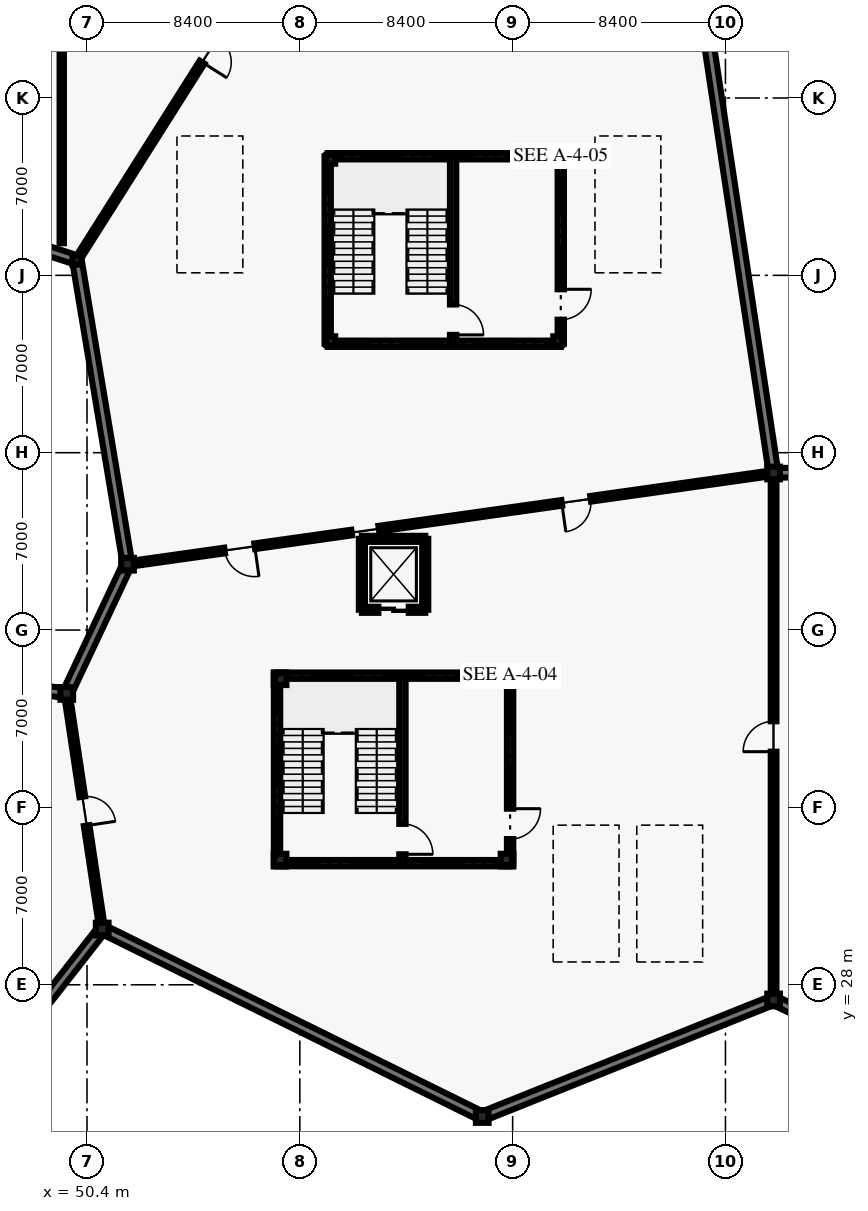
"""IFC4 building model, lengths in metres.
Left out: names, types, materials, properties, quantities, classifications, styles, units other than length and angle.
Written with IfcOpenShell. Run it as: python <this file> out.ifc"""

import sys

from ifc_helpers import new_model, si_unit, direction, frame, frame_2d, origin, origin_2d, place, context, subcontext, project, spatial, rectangle, i_section, extrude, element, fill, save


model = new_model("IFC4")
c1 = context("Model", 3, precision=1e-05, world=origin(), true_north=direction((0.0, 1.0)))
c2 = subcontext(c1, "Body", "Model", "MODEL_VIEW")
j1 = project(units=[si_unit("LENGTHUNIT", "METRE"), si_unit("PLANEANGLEUNIT", "RADIAN")], contexts=[c1])
p1 = place(None, origin())
s1 = spatial("IfcSite", under=j1, at=p1, CompositionType="ELEMENT")
p2 = place(p1, origin())
s2 = spatial("IfcBuilding", under=s1, at=p2, CompositionType="ELEMENT")
p3 = place(p2, frame((0.0, 0.0, -4.5)))
s3 = spatial("IfcBuildingStorey", under=s2, at=p3, CompositionType="ELEMENT", Elevation=-4.5)
p4 = place(p3, frame((49.6, 39.5, 0.0), z_axis=(0.0, 0.0, 1.0), x_axis=(1.0, 0.0, 0.0)))
e1 = element("IfcColumn", 1, at=p4, inside=s3, PredefinedType="COLUMN", context=c2, shape_type="SweptSolid", body=[
    extrude(i_section(OverallWidth=0.5, OverallDepth=0.5, WebThickness=0.022, FlangeThickness=0.036, at=origin_2d()), origin(), (0.0, 0.0, 1.0), 4.5),
])
p5 = place(p3, frame((50.0, 56.6, 0.0), z_axis=(0.0, 0.0, 1.0), x_axis=(1.0, 0.0, 0.0)))
e2 = element("IfcColumn", 2, at=p5, inside=s3, PredefinedType="COLUMN", context=c2, shape_type="SweptSolid", body=[
    extrude(i_section(OverallWidth=0.35, OverallDepth=0.35, WebThickness=0.02, FlangeThickness=0.028, at=origin_2d()), origin(), (0.0, 0.0, 1.0), 4.5),
])
for number, where, z_axis, x_axis in (
    (3, (51.0, 30.2, 0.0), (0.0, 0.0, 1.0), (1.0, 0.0, 0.0)),
    (4, (52.0, 44.6, 0.0), (0.0, 0.0, 1.0), (1.0, 0.0, 0.0)),
    (5, (66.0, 22.8, 0.0), (0.0, 0.0, 1.0), (1.0, 0.0, 0.0)),
    (6, (77.5, 27.4, 0.0), (0.0, 0.0, 1.0), (1.0, 0.0, 0.0)),
    (7, (77.5, 48.2, 0.0), (0.0, 0.0, 1.0), (1.0, 0.0, 0.0)),
    (8, (58.02, 32.92, 0.0), (0.0, 0.0, 1.0), (1.0, 0.0, 0.0)),
    (9, (66.98, 32.92, 0.0), (0.0, 0.0, 1.0), (1.0, 0.0, 0.0)),
    (10, (66.98, 40.08, 0.0), (0.0, 0.0, 1.0), (1.0, 0.0, 0.0)),
    (11, (58.02, 40.08, 0.0), (0.0, 0.0, 1.0), (1.0, 0.0, 0.0)),
):
    element("IfcColumn", number, at=place(p3, frame(where, z_axis=z_axis, x_axis=x_axis)), inside=s3, PredefinedType="COLUMN", context=c2, shape_type="SweptSolid", body=[
        extrude(i_section(OverallWidth=0.5, OverallDepth=0.5, WebThickness=0.022, FlangeThickness=0.036, at=origin_2d()), origin(), (0.0, 0.0, 1.0), 4.5),
    ])
for number, where, z_axis, x_axis in (
    (12, (60.02, 53.42, 0.0), (0.0, 0.0, 1.0), (1.0, 0.0, 0.0)),
    (13, (68.98, 53.42, 0.0), (0.0, 0.0, 1.0), (1.0, 0.0, 0.0)),
    (14, (68.98, 60.58, 0.0), (0.0, 0.0, 1.0), (1.0, 0.0, 0.0)),
    (15, (60.02, 60.58, 0.0), (0.0, 0.0, 1.0), (1.0, 0.0, 0.0)),
):
    element("IfcColumn", number, at=place(p3, frame(where, z_axis=z_axis, x_axis=x_axis)), inside=s3, PredefinedType="COLUMN", context=c2, shape_type="SweptSolid", body=[
        extrude(i_section(OverallWidth=0.35, OverallDepth=0.35, WebThickness=0.02, FlangeThickness=0.028, at=origin_2d()), origin(), (0.0, 0.0, 1.0), 4.5),
    ])
p6 = place(p3, frame((51.045, 30.178, 0.0), z_axis=(0.0, 0.0, 1.0), x_axis=(0.896803716147, -0.442428632329, 0.0)))
e16 = element("IfcWall", 16, at=p6, inside=s3, PredefinedType="USERDEFINED", context=c2, shape_type="SweptSolid", body=[
    extrude(rectangle(XDim=16.676, YDim=0.38, at=frame_2d((8.338, 0.0))), origin(), (0.0, 0.0, 1.0), 4.14),
])
p7 = place(p3, frame((66.0, 22.8, 0.0), z_axis=(0.0, 0.0, 1.0), x_axis=(0.928493068362, 0.371349730044, 0.0)))
e17 = element("IfcWall", 17, at=p7, inside=s3, PredefinedType="USERDEFINED", context=c2, shape_type="SweptSolid", body=[
    extrude(rectangle(XDim=12.336, YDim=0.38, at=frame_2d((6.168, 0.0))), origin(), (0.0, 0.0, 1.0), 4.14),
])
p8 = place(p3, frame((51.979, 44.555, 0.0), z_axis=(0.0, 0.0, 1.0), x_axis=(-0.42583525687, -0.904800715078, 0.0)))
e18 = element("IfcWall", 18, at=p8, inside=s3, PredefinedType="USERDEFINED", context=c2, shape_type="SweptSolid", body=[
    extrude(rectangle(XDim=5.537, YDim=0.38, at=frame_2d((2.769, 0.0))), origin(), (0.0, 0.0, 1.0), 4.14),
])
p9 = place(p3, frame((77.545, 27.378, 0.0), z_axis=(0.0, 0.0, 1.0), x_axis=(0.90154444727, -0.432686502675, 0.0)))
e19 = element("IfcWall", 19, at=p9, inside=s3, PredefinedType="USERDEFINED", context=c2, shape_type="SweptSolid", body=[
    extrude(rectangle(XDim=11.042, YDim=0.38, at=frame_2d((5.521, 0.0))), origin(), (0.0, 0.0, 1.0), 4.14),
])
p10 = place(p3, frame((95.8, 48.6, 0.0), z_axis=(0.0, 0.0, 1.0), x_axis=(-0.999760886501, -0.021867094518, 0.0)))
e20 = element("IfcWall", 20, at=p10, inside=s3, PredefinedType="USERDEFINED", context=c2, shape_type="SweptSolid", body=[
    extrude(rectangle(XDim=18.254, YDim=0.38, at=frame_2d((9.127, 0.0))), origin(), (0.0, 0.0, 1.0), 4.14),
])
p11 = place(p3, frame((50.008, 56.551, 0.0), z_axis=(0.0, 0.0, 1.0), x_axis=(0.164415392621, -0.986391189473, 0.0)))
e21 = element("IfcWall", 21, at=p11, inside=s3, PredefinedType="USERDEFINED", context=c2, shape_type="SweptSolid", body=[
    extrude(rectangle(XDim=12.066, YDim=0.38, at=frame_2d((6.033, 0.0))), origin(), (0.0, 0.0, 1.0), 4.14),
])
p12 = place(p3, frame((77.493, 48.249, 0.0), z_axis=(0.0, 0.0, 1.0), x_axis=(-0.149164377012, 0.988812413267, 0.0)))
e22 = element("IfcWall", 22, at=p12, inside=s3, PredefinedType="USERDEFINED", context=c2, shape_type="SweptSolid", body=[
    extrude(rectangle(XDim=18.053, YDim=0.38, at=frame_2d((9.026, 0.0))), origin(), (0.0, 0.0, 1.0), 4.14),
])
p13 = place(p3, frame((43.831, 21.039, 0.0), z_axis=(0.0, 0.0, 1.0), x_axis=(0.616261088059, 0.787541917199, 0.0)))
e23 = element("IfcWall", 23, at=p13, inside=s3, PredefinedType="USERDEFINED", context=c2, shape_type="SweptSolid", body=[
    extrude(rectangle(XDim=11.583, YDim=0.38, at=frame_2d((5.792, 0.0))), origin(), (0.0, 0.0, 1.0), 4.14),
])
p14 = place(p3, frame((49.55, 39.507, 0.0), z_axis=(0.0, 0.0, 1.0), x_axis=(-0.990995760024, 0.133893254555, 0.0)))
e24 = element("IfcWall", 24, at=p14, inside=s3, PredefinedType="USERDEFINED", context=c2, shape_type="SweptSolid", body=[
    extrude(rectangle(XDim=26.034, YDim=0.38, at=frame_2d((13.017, 0.0))), origin(), (0.0, 0.0, 1.0), 4.14),
])
p15 = place(p3, frame((26.348, 64.285, 0.0), z_axis=(0.0, 0.0, 1.0), x_axis=(0.951054162367, -0.309024238927, 0.0)))
e25 = element("IfcWall", 25, at=p15, inside=s3, PredefinedType="USERDEFINED", context=c2, shape_type="SweptSolid", body=[
    extrude(rectangle(XDim=24.82, YDim=0.38, at=frame_2d((12.41, 0.0))), origin(), (0.0, 0.0, 1.0), 4.14),
])
p16 = place(p3, frame((77.5, 27.4, 0.0), z_axis=(0.0, 0.0, 1.0), x_axis=(0.0, 1.0, 0.0)))
e26 = element("IfcWall", 26, at=p16, inside=s3, PredefinedType="SOLIDWALL", context=c2, shape_type="SweptSolid", body=[
    extrude(rectangle(XDim=20.8, YDim=0.225, at=frame_2d((10.4, 0.0))), origin(), (0.0, 0.0, 1.0), 4.14),
])
p17 = place(p16, frame((9.8, 0.0, 0.0)))
e27 = element("IfcOpeningElement", 27, at=p17, cuts=e26, PredefinedType="OPENING", context=c2, shape_type="SweptSolid", body=[
    extrude(rectangle(XDim=1.2, YDim=2.2, at=frame_2d((0.6, 1.1))), frame((0.0, 0.123, 0.0), z_axis=(0.0, -1.0, 0.0), x_axis=(1.0, 0.0, 0.0)), (0.0, 0.0, 1.0), 0.245),
])
p18 = place(p3, frame((77.5, 48.2, 0.0), z_axis=(0.0, 0.0, 1.0), x_axis=(-0.990181159322, -0.139790098807, 0.0)))
e28 = element("IfcWall", 28, at=p18, inside=s3, PredefinedType="SOLIDWALL", context=c2, shape_type="SweptSolid", body=[
    extrude(rectangle(XDim=15.738, YDim=0.225, at=frame_2d((7.869, 0.0))), origin(), (0.0, 0.0, 1.0), 4.14),
])
p19 = place(p18, frame((7.294, 0.0, 0.0)))
e29 = element("IfcOpeningElement", 29, at=p19, cuts=e28, PredefinedType="OPENING", context=c2, shape_type="SweptSolid", body=[
    extrude(rectangle(XDim=1.15, YDim=2.2, at=frame_2d((0.575, 1.1))), frame((0.0, 0.123, 0.0), z_axis=(0.0, -1.0, 0.0), x_axis=(1.0, 0.0, 0.0)), (0.0, 0.0, 1.0), 0.245),
])
p20 = place(p3, frame((60.85, 45.849, 0.0), z_axis=(0.0, 0.0, 1.0), x_axis=(-0.990187360524, -0.139746166523, 0.0)))
e30 = element("IfcWall", 30, at=p20, inside=s3, PredefinedType="SOLIDWALL", context=c2, shape_type="SweptSolid", body=[
    extrude(rectangle(XDim=8.938, YDim=0.225, at=frame_2d((4.469, 0.0))), origin(), (0.0, 0.0, 1.0), 4.14),
])
p21 = place(p20, frame((3.869, 0.0, 0.0)))
e31 = element("IfcOpeningElement", 31, at=p21, cuts=e30, PredefinedType="OPENING", context=c2, shape_type="SweptSolid", body=[
    extrude(rectangle(XDim=1.2, YDim=2.2, at=frame_2d((0.6, 1.1))), frame((0.0, 0.123, 0.0), z_axis=(0.0, -1.0, 0.0), x_axis=(1.0, 0.0, 0.0)), (0.0, 0.0, 1.0), 0.245),
])
p22 = place(p3, frame((49.6, 39.5, 0.0), z_axis=(0.0, 0.0, 1.0), x_axis=(0.148849460064, -0.988859867847, 0.0)))
e32 = element("IfcWall", 32, at=p22, inside=s3, PredefinedType="SOLIDWALL", context=c2, shape_type="SweptSolid", body=[
    extrude(rectangle(XDim=9.405, YDim=0.225, at=frame_2d((4.702, 0.0))), origin(), (0.0, 0.0, 1.0), 4.14),
])
p23 = place(p22, frame((4.127, 0.0, 0.0)))
e33 = element("IfcOpeningElement", 33, at=p23, cuts=e32, PredefinedType="OPENING", context=c2, shape_type="SweptSolid", body=[
    extrude(rectangle(XDim=1.15, YDim=2.2, at=frame_2d((0.575, 1.1))), frame((0.0, 0.123, 0.0), z_axis=(0.0, -1.0, 0.0), x_axis=(1.0, 0.0, 0.0)), (0.0, 0.0, 1.0), 0.245),
])
p24 = place(p3, frame((60.5, 73.2, 0.0), z_axis=(0.0, 0.0, 1.0), x_axis=(-0.534570878454, -0.845123645338, 0.0)))
e34 = element("IfcWall", 34, at=p24, inside=s3, PredefinedType="SOLIDWALL", context=c2, shape_type="SweptSolid", body=[
    extrude(rectangle(XDim=19.642, YDim=0.225, at=frame_2d((9.821, 0.0))), origin(), (0.0, 0.0, 1.0), 4.14),
])
p25 = place(p24, frame((9.246, 0.0, 0.0)))
e35 = element("IfcOpeningElement", 35, at=p25, cuts=e34, PredefinedType="OPENING", context=c2, shape_type="SweptSolid", body=[
    extrude(rectangle(XDim=1.15, YDim=2.2, at=frame_2d((0.575, 1.1))), frame((0.0, 0.123, 0.0), z_axis=(0.0, -1.0, 0.0), x_axis=(1.0, 0.0, 0.0)), (0.0, 0.0, 1.0), 0.245),
])
p26 = place(p3, frame((49.403, 57.267, 0.0), z_axis=(0.0, 0.0, 1.0), x_axis=(0.0, 1.0, 0.0)))
e36 = element("IfcWall", 36, at=p26, inside=s3, PredefinedType="PARTITIONING", context=c2, shape_type="SweptSolid", body=[
    extrude(rectangle(XDim=24.53, YDim=0.17, at=frame_2d((12.265, 0.0))), origin(), (0.0, 0.0, 1.0), 3.02),
])
p27 = place(p26, frame((11.715, 0.0, 0.0)))
e37 = element("IfcOpeningElement", 37, at=p27, cuts=e36, PredefinedType="OPENING", context=c2, shape_type="SweptSolid", body=[
    extrude(rectangle(XDim=1.1, YDim=2.2, at=frame_2d((0.55, 1.1))), frame((0.0, 0.095, 0.0), z_axis=(0.0, -1.0, 0.0), x_axis=(1.0, 0.0, 0.0)), (0.0, 0.0, 1.0), 0.19),
])
p28 = place(p3, frame((57.9, 32.8, 0.0), z_axis=(0.0, 0.0, 1.0), x_axis=(0.0, 1.0, 0.0)))
e38 = element("IfcWall", 38, at=p28, inside=s3, PredefinedType="SHEAR", context=c2, shape_type="SweptSolid", body=[
    extrude(rectangle(XDim=7.4, YDim=0.25, at=frame_2d((3.7, 0.0))), origin(), (0.0, 0.0, 1.0), 4.14),
])
for number, where, z_axis, x_axis in (
    (39, (57.9, 40.2, 0.0), (0.0, 0.0, 1.0), (1.0, 0.0, 0.0)),
    (40, (67.1, 32.8, 0.0), (0.0, 0.0, 1.0), (-1.0, 0.0, 0.0)),
):
    element("IfcWall", number, at=place(p3, frame(where, z_axis=z_axis, x_axis=x_axis)), inside=s3, PredefinedType="SHEAR", context=c2, shape_type="SweptSolid", body=[
        extrude(rectangle(XDim=9.2, YDim=0.25, at=frame_2d((4.6, 0.0))), origin(), (0.0, 0.0, 1.0), 4.14),
    ])
p29 = place(p3, frame((67.1, 40.2, 0.0), z_axis=(0.0, 0.0, 1.0), x_axis=(0.0, -1.0, 0.0)))
e41 = element("IfcWall", 41, at=p29, inside=s3, PredefinedType="SHEAR", context=c2, shape_type="SweptSolid", body=[
    extrude(rectangle(XDim=7.4, YDim=0.25, at=frame_2d((3.7, 0.0))), origin(), (0.0, 0.0, 1.0), 4.14),
])
p30 = place(p29, frame((5.25, 0.0, 0.0)))
e42 = element("IfcOpeningElement", 42, at=p30, cuts=e41, PredefinedType="OPENING", context=c2, shape_type="SweptSolid", body=[
    extrude(rectangle(XDim=1.2, YDim=2.2, at=frame_2d((0.6, 1.1))), frame((0.0, 0.135, 0.0), z_axis=(0.0, -1.0, 0.0), x_axis=(1.0, 0.0, 0.0)), (0.0, 0.0, 1.0), 0.27),
])
p31 = place(p3, frame((62.85, 40.2, 0.0), z_axis=(0.0, 0.0, 1.0), x_axis=(0.0, -1.0, 0.0)))
e43 = element("IfcWall", 43, at=p31, inside=s3, PredefinedType="SHEAR", context=c2, shape_type="SweptSolid", body=[
    extrude(rectangle(XDim=7.4, YDim=0.25, at=frame_2d((3.7, 0.0))), origin(), (0.0, 0.0, 1.0), 4.14),
])
p32 = place(p31, frame((5.85, 0.0, 0.0)))
e44 = element("IfcOpeningElement", 44, at=p32, cuts=e43, PredefinedType="OPENING", context=c2, shape_type="SweptSolid", body=[
    extrude(rectangle(XDim=1.2, YDim=2.2, at=frame_2d((0.6, 1.1))), frame((0.0, 0.135, 0.0), z_axis=(0.0, -1.0, 0.0), x_axis=(1.0, 0.0, 0.0)), (0.0, 0.0, 1.0), 0.27),
])
p33 = place(p3, frame((59.9, 53.3, 0.0), z_axis=(0.0, 0.0, 1.0), x_axis=(0.0, 1.0, 0.0)))
e45 = element("IfcWall", 45, at=p33, inside=s3, PredefinedType="SHEAR", context=c2, shape_type="SweptSolid", body=[
    extrude(rectangle(XDim=7.4, YDim=0.25, at=frame_2d((3.7, 0.0))), origin(), (0.0, 0.0, 1.0), 4.14),
])
for number, where, z_axis, x_axis in (
    (46, (59.9, 60.7, 0.0), (0.0, 0.0, 1.0), (1.0, 0.0, 0.0)),
    (47, (69.1, 53.3, 0.0), (0.0, 0.0, 1.0), (-1.0, 0.0, 0.0)),
):
    element("IfcWall", number, at=place(p3, frame(where, z_axis=z_axis, x_axis=x_axis)), inside=s3, PredefinedType="SHEAR", context=c2, shape_type="SweptSolid", body=[
        extrude(rectangle(XDim=9.2, YDim=0.25, at=frame_2d((4.6, 0.0))), origin(), (0.0, 0.0, 1.0), 4.14),
    ])
p34 = place(p3, frame((69.1, 60.7, 0.0), z_axis=(0.0, 0.0, 1.0), x_axis=(0.0, -1.0, 0.0)))
e48 = element("IfcWall", 48, at=p34, inside=s3, PredefinedType="SHEAR", context=c2, shape_type="SweptSolid", body=[
    extrude(rectangle(XDim=7.4, YDim=0.25, at=frame_2d((3.7, 0.0))), origin(), (0.0, 0.0, 1.0), 4.14),
])
p35 = place(p34, frame((5.25, 0.0, 0.0)))
e49 = element("IfcOpeningElement", 49, at=p35, cuts=e48, PredefinedType="OPENING", context=c2, shape_type="SweptSolid", body=[
    extrude(rectangle(XDim=1.2, YDim=2.2, at=frame_2d((0.6, 1.1))), frame((0.0, 0.135, 0.0), z_axis=(0.0, -1.0, 0.0), x_axis=(1.0, 0.0, 0.0)), (0.0, 0.0, 1.0), 0.27),
])
p36 = place(p3, frame((64.85, 60.7, 0.0), z_axis=(0.0, 0.0, 1.0), x_axis=(0.0, -1.0, 0.0)))
e50 = element("IfcWall", 50, at=p36, inside=s3, PredefinedType="SHEAR", context=c2, shape_type="SweptSolid", body=[
    extrude(rectangle(XDim=7.4, YDim=0.25, at=frame_2d((3.7, 0.0))), origin(), (0.0, 0.0, 1.0), 4.14),
])
p37 = place(p36, frame((5.85, 0.0, 0.0)))
e51 = element("IfcOpeningElement", 51, at=p37, cuts=e50, PredefinedType="OPENING", context=c2, shape_type="SweptSolid", body=[
    extrude(rectangle(XDim=1.2, YDim=2.2, at=frame_2d((0.6, 1.1))), frame((0.0, 0.135, 0.0), z_axis=(0.0, -1.0, 0.0), x_axis=(1.0, 0.0, 0.0)), (0.0, 0.0, 1.0), 0.27),
])
p38 = place(p3, frame((61.25, 45.6, 0.0), z_axis=(0.0, 0.0, 1.0), x_axis=(1.0, 0.0, 0.0)))
e52 = element("IfcWall", 52, at=p38, inside=s3, PredefinedType="SHEAR", context=c2, shape_type="SweptSolid", body=[
    extrude(rectangle(XDim=2.5, YDim=0.24, at=frame_2d((1.25, 0.0))), origin(), (0.0, 0.0, 1.0), 4.26),
])
for number, where, z_axis, x_axis in (
    (53, (63.75, 45.6, 0.0), (0.0, 0.0, 1.0), (0.0, -1.0, 0.0)),
    (54, (61.25, 42.8, 0.0), (0.0, 0.0, 1.0), (0.0, 1.0, 0.0)),
):
    element("IfcWall", number, at=place(p3, frame(where, z_axis=z_axis, x_axis=x_axis)), inside=s3, PredefinedType="SHEAR", context=c2, shape_type="SweptSolid", body=[
        extrude(rectangle(XDim=2.8, YDim=0.24, at=frame_2d((1.4, 0.0))), origin(), (0.0, 0.0, 1.0), 4.26),
    ])
p39 = place(p3, frame((63.75, 42.8, 0.0), z_axis=(0.0, 0.0, 1.0), x_axis=(-1.0, 0.0, 0.0)))
e55 = element("IfcWall", 55, at=p39, inside=s3, PredefinedType="SHEAR", context=c2, shape_type="SweptSolid", body=[
    extrude(rectangle(XDim=2.5, YDim=0.24, at=frame_2d((1.25, 0.0))), origin(), (0.0, 0.0, 1.0), 4.26),
])
p40 = place(p39, frame((0.65, 0.0, 0.0)))
e56 = element("IfcOpeningElement", 56, at=p40, cuts=e55, PredefinedType="OPENING", context=c2, shape_type="SweptSolid", body=[
    extrude(rectangle(XDim=1.2, YDim=2.2, at=frame_2d((0.6, 1.1))), frame((0.0, 0.13, 0.0), z_axis=(0.0, -1.0, 0.0), x_axis=(1.0, 0.0, 0.0)), (0.0, 0.0, 1.0), 0.26),
])
p41 = place(p17, origin())
e57 = element("IfcDoor", 57, at=p41, inside=s3, OperationType="SINGLE_SWING_LEFT", PredefinedType="DOOR", context=c2, shape_type="SweptSolid", body=[
    extrude(rectangle(XDim=1.2, YDim=2.2, at=frame_2d((0.6, 1.1))), frame((0.0, 0.025, 0.0), z_axis=(0.0, -1.0, 0.0), x_axis=(1.0, 0.0, 0.0)), (0.0, 0.0, 1.0), 0.05),
])
fill(e27, e57)
p42 = place(p19, origin())
e58 = element("IfcDoor", 58, at=p42, inside=s3, OperationType="SINGLE_SWING_RIGHT", PredefinedType="DOOR", context=c2, shape_type="SweptSolid", body=[
    extrude(rectangle(XDim=1.15, YDim=2.2, at=frame_2d((0.575, 1.1))), frame((0.0, 0.025, 0.0), z_axis=(0.0, -1.0, 0.0), x_axis=(1.0, 0.0, 0.0)), (0.0, 0.0, 1.0), 0.05),
])
fill(e29, e58)
p43 = place(p21, origin())
e59 = element("IfcDoor", 59, at=p43, inside=s3, OperationType="SINGLE_SWING_LEFT", PredefinedType="DOOR", context=c2, shape_type="SweptSolid", body=[
    extrude(rectangle(XDim=1.2, YDim=2.2, at=frame_2d((0.6, 1.1))), frame((0.0, 0.025, 0.0), z_axis=(0.0, -1.0, 0.0), x_axis=(1.0, 0.0, 0.0)), (0.0, 0.0, 1.0), 0.05),
])
fill(e31, e59)
p44 = place(p23, origin())
e60 = element("IfcDoor", 60, at=p44, inside=s3, OperationType="SINGLE_SWING_RIGHT", PredefinedType="DOOR", context=c2, shape_type="SweptSolid", body=[
    extrude(rectangle(XDim=1.15, YDim=2.2, at=frame_2d((0.575, 1.1))), frame((0.0, 0.025, 0.0), z_axis=(0.0, -1.0, 0.0), x_axis=(1.0, 0.0, 0.0)), (0.0, 0.0, 1.0), 0.05),
])
fill(e33, e60)
p45 = place(p25, origin())
e61 = element("IfcDoor", 61, at=p45, inside=s3, OperationType="SINGLE_SWING_RIGHT", PredefinedType="DOOR", context=c2, shape_type="SweptSolid", body=[
    extrude(rectangle(XDim=1.15, YDim=2.2, at=frame_2d((0.575, 1.1))), frame((0.0, 0.025, 0.0), z_axis=(0.0, -1.0, 0.0), x_axis=(1.0, 0.0, 0.0)), (0.0, 0.0, 1.0), 0.05),
])
fill(e35, e61)
p46 = place(p30, origin())
e62 = element("IfcDoor", 62, at=p46, inside=s3, OperationType="SINGLE_SWING_LEFT", PredefinedType="DOOR", context=c2, shape_type="SweptSolid", body=[
    extrude(rectangle(XDim=1.2, YDim=2.2, at=frame_2d((0.6, 1.1))), frame((0.0, 0.025, 0.0), z_axis=(0.0, -1.0, 0.0), x_axis=(1.0, 0.0, 0.0)), (0.0, 0.0, 1.0), 0.05),
])
fill(e42, e62)
p47 = place(p32, origin())
e63 = element("IfcDoor", 63, at=p47, inside=s3, OperationType="SINGLE_SWING_RIGHT", PredefinedType="DOOR", context=c2, shape_type="SweptSolid", body=[
    extrude(rectangle(XDim=1.2, YDim=2.2, at=frame_2d((0.6, 1.1))), frame((0.0, 0.025, 0.0), z_axis=(0.0, -1.0, 0.0), x_axis=(1.0, 0.0, 0.0)), (0.0, 0.0, 1.0), 0.05),
])
fill(e44, e63)
p48 = place(p35, origin())
e64 = element("IfcDoor", 64, at=p48, inside=s3, OperationType="SINGLE_SWING_LEFT", PredefinedType="DOOR", context=c2, shape_type="SweptSolid", body=[
    extrude(rectangle(XDim=1.2, YDim=2.2, at=frame_2d((0.6, 1.1))), frame((0.0, 0.025, 0.0), z_axis=(0.0, -1.0, 0.0), x_axis=(1.0, 0.0, 0.0)), (0.0, 0.0, 1.0), 0.05),
])
fill(e49, e64)
p49 = place(p37, origin())
e65 = element("IfcDoor", 65, at=p49, inside=s3, OperationType="SINGLE_SWING_RIGHT", PredefinedType="DOOR", context=c2, shape_type="SweptSolid", body=[
    extrude(rectangle(XDim=1.2, YDim=2.2, at=frame_2d((0.6, 1.1))), frame((0.0, 0.025, 0.0), z_axis=(0.0, -1.0, 0.0), x_axis=(1.0, 0.0, 0.0)), (0.0, 0.0, 1.0), 0.05),
])
fill(e51, e65)
p50 = place(p40, origin())
e66 = element("IfcDoor", 66, at=p50, inside=s3, OperationType="SLIDING_TO_LEFT", PredefinedType="DOOR", context=c2, shape_type="SweptSolid", body=[
    extrude(rectangle(XDim=1.2, YDim=2.2, at=frame_2d((0.6, 1.1))), frame((0.0, 0.025, 0.0), z_axis=(0.0, -1.0, 0.0), x_axis=(1.0, 0.0, 0.0)), (0.0, 0.0, 1.0), 0.05),
])
fill(e56, e66)
save(model, sys.argv[1])
